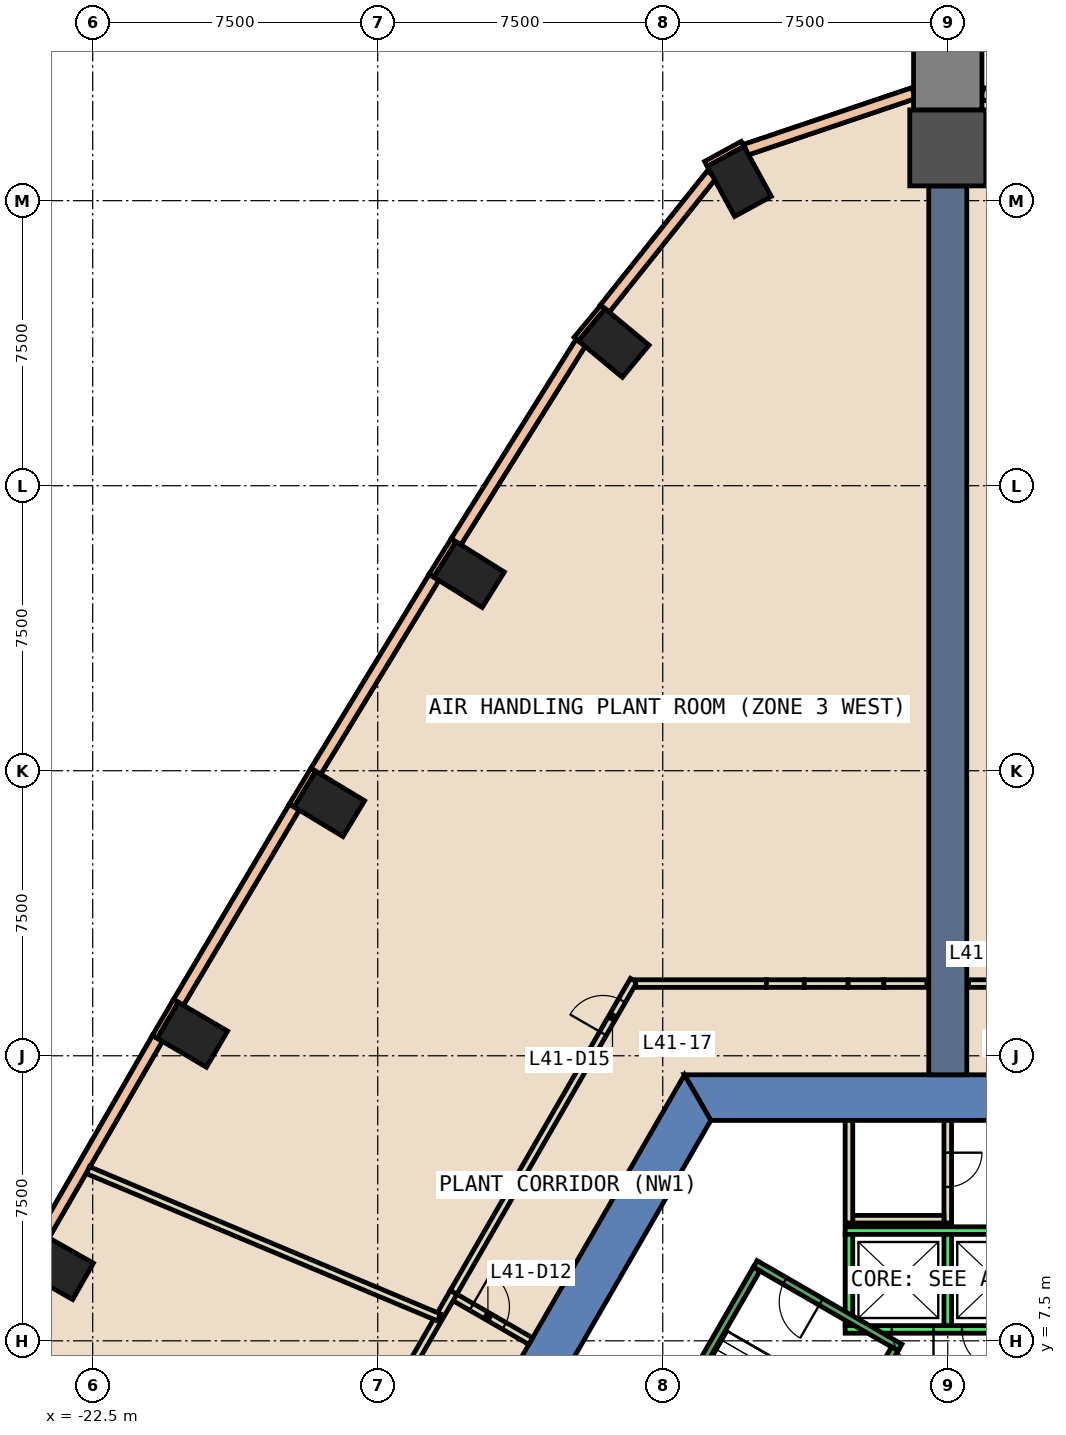
"""IFC4 building model, lengths in metres.
Left out: names, types, materials, properties, quantities, classifications, styles, units other than length and angle.
Written with IfcOpenShell. Run it as: python <this file> out.ifc"""

import sys

from ifc_helpers import new_model, si_unit, direction, frame, frame_2d, origin, origin_2d, place, context, subcontext, project, spatial, polyline, rectangle, outline, extrude, element, fill, save


model = new_model("IFC4")
c1 = context("Model", 3, precision=1e-05, world=origin(), true_north=direction((0.0, 1.0)))
c2 = subcontext(c1, "Body", "Model", "MODEL_VIEW")
j1 = project(units=[si_unit("LENGTHUNIT", "METRE"), si_unit("PLANEANGLEUNIT", "RADIAN")], contexts=[c1])
p1 = place(None, origin())
s1 = spatial("IfcSite", under=j1, at=p1, CompositionType="ELEMENT")
p2 = place(p1, origin())
s2 = spatial("IfcBuilding", under=s1, at=p2, CompositionType="ELEMENT")
p3 = place(p2, frame((0.0, 0.0, 184.4)))
s3 = spatial("IfcBuildingStorey", under=s2, at=p3, CompositionType="ELEMENT", Elevation=184.4)
p4 = place(p3, frame((0.0, 38.889, -0.6), z_axis=(0.0, 0.0, 1.0), x_axis=(0.0, 1.0, 0.0)))
e1 = element("IfcColumn", 1, at=p4, inside=s3, PredefinedType="COLUMN", context=c2, shape_type="SweptSolid", body=[
    extrude(rectangle(XDim=2.0, YDim=2.0, at=origin_2d()), origin(), (0.0, 0.0, 1.0), 5.4),
])
for number, where, z_axis, x_axis in (
    (2, (-5.485, 38.006, -0.6), (0.0, 0.0, 1.0), (0.878, 0.479, 0.0)),
    (3, (-8.789, 33.754, -0.6), (0.0, 0.0, 1.0), (0.639, 0.769, 0.0)),
    (4, (-12.596, 27.66, -0.6), (0.0, 0.0, 1.0), (0.53, 0.848, 0.0)),
    (5, (-16.272, 21.628, -0.6), (0.0, 0.0, 1.0), (0.518, 0.855, 0.0)),
    (6, (-19.876, 15.554, -0.6), (0.0, 0.0, 1.0), (0.506, 0.863, 0.0)),
    (7, (-23.407, 9.436, -0.6), (0.0, 0.0, 1.0), (0.494, 0.869, 0.0)),
):
    element("IfcColumn", number, at=place(p3, frame(where, z_axis=z_axis, x_axis=x_axis)), inside=s3, PredefinedType="COLUMN", context=c2, shape_type="SweptSolid", body=[
        extrude(rectangle(XDim=1.1, YDim=1.5, at=origin_2d()), origin(), (0.0, 0.0, 1.0), 5.4),
    ])
p5 = place(p3, frame((0.0, 40.789, -0.6), z_axis=(0.0, 0.0, 1.0), x_axis=(0.0, 1.0, 0.0)))
e8 = element("IfcColumn", 8, at=p5, inside=s3, PredefinedType="COLUMN", context=c2, shape_type="SweptSolid", body=[
    extrude(rectangle(XDim=1.8, YDim=1.8, at=origin_2d()), origin(), (0.0, 0.0, 1.0), 5.4),
])
p6 = place(p3, frame((0.0, 0.0, -0.6)))
e9 = element("IfcWall", 9, at=p6, inside=s3, PredefinedType="SHEAR", context=c2, shape_type="SweptSolid", body=[
    extrude(outline(polyline([(6.928, 14.5), (-6.928, 14.5), (-6.235, 13.3), (6.235, 13.3), (6.928, 14.5)])), origin(), (0.0, 0.0, 1.0), 5.4),
])
p7 = place(p3, frame((0.0, 0.0, -0.6)))
e10 = element("IfcWall", 10, at=p7, inside=s3, PredefinedType="SHEAR", context=c2, shape_type="SweptSolid", body=[
    extrude(outline(polyline([(-12.267, 5.252), (-11.228, 4.652), (-6.235, 13.3), (-6.928, 14.5), (-12.267, 5.252)])), origin(), (0.0, 0.0, 1.0), 5.4),
])
p8 = place(p3, frame((0.0, 14.5, 0.0), z_axis=(0.0, 0.0, 1.0), x_axis=(0.0, 1.0, 0.0)))
e11 = element("IfcWall", 11, at=p8, inside=s3, PredefinedType="SHEAR", context=c2, shape_type="SweptSolid", body=[
    extrude(rectangle(XDim=23.389, YDim=1.0, at=frame_2d((11.694, 0.0))), origin(), (0.0, 0.0, 1.0), 4.8),
])
p9 = place(p3, frame((-5.397, 38.994, 0.0), z_axis=(0.0, 0.0, 1.0), x_axis=(-0.877929486755, -0.478789950068, 0.0)))
e12 = element("IfcWall", 12, at=p9, inside=s3, PredefinedType="STANDARD", context=c2, shape_type="SweptSolid", body=[
    extrude(rectangle(XDim=1.1, YDim=0.15, at=frame_2d((0.55, 0.0))), origin(), (0.0, 0.0, 1.0), 4.8),
])
for number, where, z_axis, x_axis in (
    (13, (-9.072, 34.704, 0.0), (0.0, 0.0, 1.0), (-0.639, -0.769, 0.0)),
    (14, (-13.004, 28.564, 0.0), (0.0, 0.0, 1.0), (-0.53, -0.848, 0.0)),
    (15, (-16.693, 22.526, 0.0), (0.0, 0.0, 1.0), (-0.518, -0.855, 0.0)),
):
    element("IfcWall", number, at=place(p3, frame(where, z_axis=z_axis, x_axis=x_axis)), inside=s3, PredefinedType="STANDARD", context=c2, shape_type="SweptSolid", body=[
        extrude(rectangle(XDim=1.1, YDim=0.15, at=frame_2d((0.55, 0.0))), origin(), (0.0, 0.0, 1.0), 4.8),
    ])
p10 = place(p3, frame((-20.309, 16.445, 0.0), z_axis=(0.0, 0.0, 1.0), x_axis=(-0.506505715302, -0.862236603472, 0.0)))
e16 = element("IfcWall", 16, at=p10, inside=s3, PredefinedType="STANDARD", context=c2, shape_type="SweptSolid", body=[
    extrude(rectangle(XDim=1.099, YDim=0.15, at=frame_2d((0.55, 0.0))), origin(), (0.0, 0.0, 1.0), 4.8),
])
p11 = place(p3, frame((5.315, 38.84, 0.0), z_axis=(0.0, 0.0, 1.0), x_axis=(-0.947661997786, 0.319275332514, 0.0)))
e17 = element("IfcWall", 17, at=p11, inside=s3, PredefinedType="STANDARD", context=c2, shape_type="SweptSolid", body=[
    extrude(rectangle(XDim=4.66, YDim=0.3, at=frame_2d((2.33, 0.0))), origin(), (0.0, 0.0, 1.0), 1.2),
])
p12 = place(p3, frame((5.315, 38.84, 4.0), z_axis=(0.0, 0.0, 1.0), x_axis=(-0.947661997786, 0.319275332514, 0.0)))
e18 = element("IfcWall", 18, at=p12, inside=s3, PredefinedType="STANDARD", context=c2, shape_type="SweptSolid", body=[
    extrude(rectangle(XDim=4.66, YDim=0.3, at=frame_2d((2.33, 0.0))), origin(), (0.0, 0.0, 1.0), 0.8),
])
p13 = place(p3, frame((-0.899, 40.328, 0.0), z_axis=(0.0, 0.0, 1.0), x_axis=(-0.947661997786, -0.319275332514, 0.0)))
e19 = element("IfcWall", 19, at=p13, inside=s3, PredefinedType="STANDARD", context=c2, shape_type="SweptSolid", body=[
    extrude(rectangle(XDim=4.66, YDim=0.3, at=frame_2d((2.33, 0.0))), origin(), (0.0, 0.0, 1.0), 1.2),
])
p14 = place(p3, frame((-0.899, 40.328, 4.0), z_axis=(0.0, 0.0, 1.0), x_axis=(-0.947661997786, -0.319275332514, 0.0)))
e20 = element("IfcWall", 20, at=p14, inside=s3, PredefinedType="STANDARD", context=c2, shape_type="SweptSolid", body=[
    extrude(rectangle(XDim=4.66, YDim=0.3, at=frame_2d((2.33, 0.0))), origin(), (0.0, 0.0, 1.0), 0.8),
])
p15 = place(p3, frame((-6.21, 38.188, 0.0), z_axis=(0.0, 0.0, 1.0), x_axis=(-0.623651555058, -0.781702461218, 0.0)))
e21 = element("IfcWall", 21, at=p15, inside=s3, PredefinedType="STANDARD", context=c2, shape_type="SweptSolid", body=[
    extrude(rectangle(XDim=4.51, YDim=0.3, at=frame_2d((2.255, 0.0))), origin(), (0.0, 0.0, 1.0), 1.2),
])
p16 = place(p3, frame((-6.21, 38.188, 4.0), z_axis=(0.0, 0.0, 1.0), x_axis=(-0.623651555058, -0.781702461218, 0.0)))
e22 = element("IfcWall", 22, at=p16, inside=s3, PredefinedType="STANDARD", context=c2, shape_type="SweptSolid", body=[
    extrude(rectangle(XDim=4.51, YDim=0.3, at=frame_2d((2.255, 0.0))), origin(), (0.0, 0.0, 1.0), 0.8),
])
p17 = place(p3, frame((-9.659, 33.763, 0.0), z_axis=(0.0, 0.0, 1.0), x_axis=(-0.530698032758, -0.847560970094, 0.0)))
e23 = element("IfcWall", 23, at=p17, inside=s3, PredefinedType="STANDARD", context=c2, shape_type="SweptSolid", body=[
    extrude(rectangle(XDim=6.182, YDim=0.3, at=frame_2d((3.091, 0.0))), origin(), (0.0, 0.0, 1.0), 1.2),
])
p18 = place(p3, frame((-9.659, 33.763, 4.0), z_axis=(0.0, 0.0, 1.0), x_axis=(-0.530698032758, -0.847560970094, 0.0)))
e24 = element("IfcWall", 24, at=p18, inside=s3, PredefinedType="STANDARD", context=c2, shape_type="SweptSolid", body=[
    extrude(rectangle(XDim=6.182, YDim=0.3, at=frame_2d((3.091, 0.0))), origin(), (0.0, 0.0, 1.0), 0.8),
])
p19 = place(p3, frame((-13.517, 27.589, 0.0), z_axis=(0.0, 0.0, 1.0), x_axis=(-0.520441839765, -0.853897119928, 0.0)))
e25 = element("IfcWall", 25, at=p19, inside=s3, PredefinedType="STANDARD", context=c2, shape_type="SweptSolid", body=[
    extrude(rectangle(XDim=5.977, YDim=0.3, at=frame_2d((2.989, 0.0))), origin(), (0.0, 0.0, 1.0), 1.2),
])
p20 = place(p3, frame((-13.517, 27.589, 4.0), z_axis=(0.0, 0.0, 1.0), x_axis=(-0.520441839765, -0.853897119928, 0.0)))
e26 = element("IfcWall", 26, at=p20, inside=s3, PredefinedType="STANDARD", context=c2, shape_type="SweptSolid", body=[
    extrude(rectangle(XDim=5.977, YDim=0.3, at=frame_2d((2.989, 0.0))), origin(), (0.0, 0.0, 1.0), 0.8),
])
p21 = place(p3, frame((-17.194, 21.544, 0.0), z_axis=(0.0, 0.0, 1.0), x_axis=(-0.510120456318, -0.860102970606, 0.0)))
e27 = element("IfcWall", 27, at=p21, inside=s3, PredefinedType="STANDARD", context=c2, shape_type="SweptSolid", body=[
    extrude(rectangle(XDim=5.975, YDim=0.3, at=frame_2d((2.987, 0.0))), origin(), (0.0, 0.0, 1.0), 1.2),
])
p22 = place(p3, frame((-17.194, 21.544, 4.0), z_axis=(0.0, 0.0, 1.0), x_axis=(-0.510120456318, -0.860102970606, 0.0)))
e28 = element("IfcWall", 28, at=p22, inside=s3, PredefinedType="STANDARD", context=c2, shape_type="SweptSolid", body=[
    extrude(rectangle(XDim=5.975, YDim=0.3, at=frame_2d((2.987, 0.0))), origin(), (0.0, 0.0, 1.0), 0.8),
])
p23 = place(p3, frame((-20.797, 15.458, 0.0), z_axis=(0.0, 0.0, 1.0), x_axis=(-0.499926373932, -0.866067907642, 0.0)))
e29 = element("IfcWall", 29, at=p23, inside=s3, PredefinedType="STANDARD", context=c2, shape_type="SweptSolid", body=[
    extrude(rectangle(XDim=5.977, YDim=0.3, at=frame_2d((2.988, 0.0))), origin(), (0.0, 0.0, 1.0), 1.2),
])
p24 = place(p3, frame((-20.797, 15.458, 4.0), z_axis=(0.0, 0.0, 1.0), x_axis=(-0.499926373932, -0.866067907642, 0.0)))
e30 = element("IfcWall", 30, at=p24, inside=s3, PredefinedType="STANDARD", context=c2, shape_type="SweptSolid", body=[
    extrude(rectangle(XDim=5.977, YDim=0.3, at=frame_2d((2.988, 0.0))), origin(), (0.0, 0.0, 1.0), 0.8),
])
p25 = place(p3, frame((0.0, 13.3, 0.0), z_axis=(0.0, 0.0, 1.0), x_axis=(0.0, -1.0, 0.0)))
e31 = element("IfcWall", 31, at=p25, inside=s3, PredefinedType="PARTITIONING", context=c2, shape_type="SweptSolid", body=[
    extrude(rectangle(XDim=2.7, YDim=0.2, at=frame_2d((1.35, 0.0))), origin(), (0.0, 0.0, 1.0), 4.8),
])
p26 = place(p25, frame((0.85, 0.0, 0.0)))
e32 = element("IfcOpeningElement", 32, at=p26, cuts=e31, PredefinedType="OPENING", context=c2, shape_type="SweptSolid", body=[
    extrude(rectangle(XDim=0.9, YDim=2.1, at=frame_2d((0.45, 1.05))), frame((0.0, 0.11, 0.0), z_axis=(0.0, -1.0, 0.0), x_axis=(1.0, 0.0, 0.0)), (0.0, 0.0, 1.0), 0.22),
])
p27 = place(p3, frame((-0.1, 10.7, 0.0), z_axis=(0.0, 0.0, 1.0), x_axis=(-1.0, 0.0, 0.0)))
e33 = element("IfcWall", 33, at=p27, inside=s3, PredefinedType="PARTITIONING", context=c2, shape_type="SweptSolid", body=[
    extrude(rectangle(XDim=2.4, YDim=0.2, at=frame_2d((1.2, 0.0))), origin(), (0.0, 0.0, 1.0), 4.8),
])
p28 = place(p3, frame((-2.6, 10.6, 0.0), z_axis=(0.0, 0.0, 1.0), x_axis=(0.0, 1.0, 0.0)))
e34 = element("IfcWall", 34, at=p28, inside=s3, PredefinedType="PARTITIONING", context=c2, shape_type="SweptSolid", body=[
    extrude(rectangle(XDim=2.7, YDim=0.2, at=frame_2d((1.35, 0.0))), origin(), (0.0, 0.0, 1.0), 4.8),
])
p29 = place(p3, frame((0.55, 16.9, 0.0), z_axis=(0.0, 0.0, 1.0), x_axis=(1.0, 0.0, 0.0)))
e35 = element("IfcWall", 35, at=p29, inside=s3, PredefinedType="PARTITIONING", context=c2, shape_type="SweptSolid", body=[
    extrude(rectangle(XDim=2.51, YDim=0.2, at=frame_2d((1.255, 0.0))), origin(), (0.0, 0.0, 1.0), 4.8),
])
p30 = place(p29, frame((0.83, 0.0, 0.0)))
e36 = element("IfcOpeningElement", 36, at=p30, cuts=e35, PredefinedType="OPENING", context=c2, shape_type="SweptSolid", body=[
    extrude(rectangle(XDim=1.0, YDim=2.1, at=frame_2d((0.5, 1.05))), frame((0.0, 0.11, 0.0), z_axis=(0.0, -1.0, 0.0), x_axis=(1.0, 0.0, 0.0)), (0.0, 0.0, 1.0), 0.22),
])
p31 = place(p3, frame((0.0, 39.909, 0.0), z_axis=(0.0, 0.0, 1.0), x_axis=(0.0, 1.0, 0.0)))
e37 = element("IfcWall", 37, at=p31, inside=s3, PredefinedType="PARTITIONING", context=c2, shape_type="SweptSolid", body=[
    extrude(rectangle(XDim=0.5, YDim=0.2, at=frame_2d((0.25, 0.0))), origin(), (0.0, 0.0, 1.0), 4.8),
])
p32 = place(p3, frame((-13.053, 8.691, 0.0), z_axis=(0.0, 0.0, 1.0), x_axis=(0.865973769406, -0.500089422704, 0.0)))
e38 = element("IfcWall", 38, at=p32, inside=s3, PredefinedType="PARTITIONING", context=c2, shape_type="SweptSolid", body=[
    extrude(rectangle(XDim=2.399, YDim=0.2, at=frame_2d((1.2, 0.0))), origin(), (0.0, 0.0, 1.0), 4.8),
])
p33 = place(p32, frame((0.6, 0.0, 0.0)))
e39 = element("IfcOpeningElement", 39, at=p33, cuts=e38, PredefinedType="OPENING", context=c2, shape_type="SweptSolid", body=[
    extrude(rectangle(XDim=1.0, YDim=2.1, at=frame_2d((0.5, 1.05))), frame((0.0, 0.11, 0.0), z_axis=(0.0, -1.0, 0.0), x_axis=(1.0, 0.0, 0.0)), (0.0, 0.0, 1.0), 0.22),
])
p34 = place(p3, frame((-16.603, 2.542, 0.0), z_axis=(0.0, 0.0, 1.0), x_axis=(0.499968011863, 0.866043871356, 0.0)))
e40 = element("IfcWall", 40, at=p34, inside=s3, PredefinedType="PARTITIONING", context=c2, shape_type="SweptSolid", body=[
    extrude(rectangle(XDim=7.201, YDim=0.2, at=frame_2d((3.6, 0.0))), origin(), (0.0, 0.0, 1.0), 4.8),
])
p35 = place(p34, frame((2.654, 0.0, 0.0)))
e41 = element("IfcOpeningElement", 41, at=p35, cuts=e40, PredefinedType="OPENING", context=c2, shape_type="SweptSolid", body=[
    extrude(rectangle(XDim=1.0, YDim=2.1, at=frame_2d((0.5, 1.05))), frame((0.0, 0.11, 0.0), z_axis=(0.0, -1.0, 0.0), x_axis=(1.0, 0.0, 0.0)), (0.0, 0.0, 1.0), 0.22),
])
p36 = place(p3, frame((-13.003, 8.778, 0.0), z_axis=(0.0, 0.0, 1.0), x_axis=(0.499964736285, 0.866045762343, 0.0)))
e42 = element("IfcWall", 42, at=p36, inside=s3, PredefinedType="PARTITIONING", context=c2, shape_type="SweptSolid", body=[
    extrude(rectangle(XDim=9.479, YDim=0.2, at=frame_2d((4.739, 0.0))), origin(), (0.0, 0.0, 1.0), 4.8),
])
p37 = place(p36, frame((7.862, 0.0, 0.0)))
e43 = element("IfcOpeningElement", 43, at=p37, cuts=e42, PredefinedType="OPENING", context=c2, shape_type="SweptSolid", body=[
    extrude(rectangle(XDim=1.0, YDim=2.1, at=frame_2d((0.5, 1.05))), frame((0.0, 0.11, 0.0), z_axis=(0.0, -1.0, 0.0), x_axis=(1.0, 0.0, 0.0)), (0.0, 0.0, 1.0), 0.22),
])
p38 = place(p3, frame((-8.214, 16.9, 0.0), z_axis=(0.0, 0.0, 1.0), x_axis=(1.0, 0.0, 0.0)))
e44 = element("IfcWall", 44, at=p38, inside=s3, PredefinedType="PARTITIONING", context=c2, shape_type="SweptSolid", body=[
    extrude(rectangle(XDim=3.441, YDim=0.2, at=frame_2d((1.721, 0.0))), origin(), (0.0, 0.0, 1.0), 4.8),
])
p39 = place(p3, frame((-22.625, 11.99, 0.0), z_axis=(0.0, 0.0, 1.0), x_axis=(0.922173915382, -0.386775477233, 0.0)))
e45 = element("IfcWall", 45, at=p39, inside=s3, PredefinedType="PARTITIONING", context=c2, shape_type="SweptSolid", body=[
    extrude(rectangle(XDim=10.019, YDim=0.2, at=frame_2d((5.009, 0.0))), origin(), (0.0, 0.0, 1.0), 4.8),
])
p40 = place(p3, frame((-4.773, 16.9, 0.0), z_axis=(0.0, 0.0, 1.0), x_axis=(1.0, 0.0, 0.0)))
e46 = element("IfcWall", 46, at=p40, inside=s3, PredefinedType="PARTITIONING", context=c2, shape_type="SweptSolid", body=[
    extrude(rectangle(XDim=0.998, YDim=0.2, at=frame_2d((0.499, 0.0))), origin(), (0.0, 0.0, 1.0), 2.4),
])
p41 = place(p3, frame((-3.775, 16.9, 0.0), z_axis=(0.0, 0.0, 1.0), x_axis=(1.0, 0.0, 0.0)))
e47 = element("IfcWall", 47, at=p41, inside=s3, PredefinedType="PARTITIONING", context=c2, shape_type="SweptSolid", body=[
    extrude(rectangle(XDim=1.153, YDim=0.2, at=frame_2d((0.576, 0.0))), origin(), (0.0, 0.0, 1.0), 4.8),
])
p42 = place(p3, frame((-2.622, 16.9, 0.0), z_axis=(0.0, 0.0, 1.0), x_axis=(1.0, 0.0, 0.0)))
e48 = element("IfcWall", 48, at=p42, inside=s3, PredefinedType="PARTITIONING", context=c2, shape_type="SweptSolid", body=[
    extrude(rectangle(XDim=0.94, YDim=0.2, at=frame_2d((0.47, 0.0))), origin(), (0.0, 0.0, 1.0), 2.4),
])
p43 = place(p3, frame((-1.682, 16.9, 0.0), z_axis=(0.0, 0.0, 1.0), x_axis=(1.0, 0.0, 0.0)))
e49 = element("IfcWall", 49, at=p43, inside=s3, PredefinedType="PARTITIONING", context=c2, shape_type="SweptSolid", body=[
    extrude(rectangle(XDim=1.132, YDim=0.2, at=frame_2d((0.566, 0.0))), origin(), (0.0, 0.0, 1.0), 4.8),
])
p44 = place(p3, frame((2.7, 7.8, 0.0), z_axis=(0.0, 0.0, 1.0), x_axis=(-1.0, 0.0, 0.0)))
e50 = element("IfcWall", 50, at=p44, inside=s3, PredefinedType="STANDARD", context=c2, shape_type="SweptSolid", body=[
    extrude(rectangle(XDim=5.4, YDim=0.2, at=frame_2d((2.7, 0.0))), origin(), (0.0, 0.0, 1.0), 4.8),
])
p45 = place(p44, frame((1.225, 0.0, 0.0)))
e51 = element("IfcOpeningElement", 51, at=p45, cuts=e50, PredefinedType="OPENING", context=c2, shape_type="SweptSolid", body=[
    extrude(rectangle(XDim=1.1, YDim=2.1, at=frame_2d((0.55, 1.05))), frame((0.0, 0.11, 0.0), z_axis=(0.0, -1.0, 0.0), x_axis=(1.0, 0.0, 0.0)), (0.0, 0.0, 1.0), 0.22),
])
p46 = place(p44, frame((3.075, 0.0, 0.0)))
e52 = element("IfcOpeningElement", 52, at=p46, cuts=e50, PredefinedType="OPENING", context=c2, shape_type="SweptSolid", body=[
    extrude(rectangle(XDim=1.1, YDim=2.1, at=frame_2d((0.55, 1.05))), frame((0.0, 0.11, 0.0), z_axis=(0.0, -1.0, 0.0), x_axis=(1.0, 0.0, 0.0)), (0.0, 0.0, 1.0), 0.22),
])
p47 = place(p3, frame((2.7, 10.4, 0.0), z_axis=(0.0, 0.0, 1.0), x_axis=(-1.0, 0.0, 0.0)))
e53 = element("IfcWall", 53, at=p47, inside=s3, PredefinedType="STANDARD", context=c2, shape_type="SweptSolid", body=[
    extrude(rectangle(XDim=5.4, YDim=0.2, at=frame_2d((2.7, 0.0))), origin(), (0.0, 0.0, 1.0), 4.8),
])
for number, where, z_axis, x_axis in (
    (54, (0.0, 7.9, 0.0), (0.0, 0.0, 1.0), (0.0, 1.0, 0.0)),
    (55, (-2.6, 7.9, 0.0), (0.0, 0.0, 1.0), (0.0, 1.0, 0.0)),
):
    element("IfcWall", number, at=place(p3, frame(where, z_axis=z_axis, x_axis=x_axis)), inside=s3, PredefinedType="STANDARD", context=c2, shape_type="SweptSolid", body=[
        extrude(rectangle(XDim=2.4, YDim=0.2, at=frame_2d((1.2, 0.0))), origin(), (0.0, 0.0, 1.0), 4.8),
    ])
p48 = place(p3, frame((-1.256, 7.324, 0.0), z_axis=(0.0, 0.0, 1.0), x_axis=(-0.866046073146, 0.499964197906, 0.0)))
e56 = element("IfcWall", 56, at=p48, inside=s3, PredefinedType="STANDARD", context=c2, shape_type="SweptSolid", body=[
    extrude(rectangle(XDim=4.4, YDim=0.2, at=frame_2d((2.2, 0.0))), origin(), (0.0, 0.0, 1.0), 4.8),
])
p49 = place(p48, frame((2.4, 0.0, 0.0)))
e57 = element("IfcOpeningElement", 57, at=p49, cuts=e56, PredefinedType="OPENING", context=c2, shape_type="SweptSolid", body=[
    extrude(rectangle(XDim=1.1, YDim=2.2, at=frame_2d((0.55, 1.1))), frame((0.0, 0.11, 0.0), z_axis=(0.0, -1.0, 0.0), x_axis=(1.0, 0.0, 0.0)), (0.0, 0.0, 1.0), 0.22),
])
p50 = place(p3, frame((-1.393, 7.288, 0.0), z_axis=(0.0, 0.0, 1.0), x_axis=(-0.499963383562, -0.866046543262, 0.0)))
e58 = element("IfcWall", 58, at=p50, inside=s3, PredefinedType="STANDARD", context=c2, shape_type="SweptSolid", body=[
    extrude(rectangle(XDim=6.9, YDim=0.2, at=frame_2d((3.45, 0.0))), origin(), (0.0, 0.0, 1.0), 4.8),
])
p51 = place(p50, frame((0.45, 0.0, 0.0)))
e59 = element("IfcOpeningElement", 59, at=p51, cuts=e58, PredefinedType="OPENING", context=c2, shape_type="SweptSolid", body=[
    extrude(rectangle(XDim=1.1, YDim=2.2, at=frame_2d((0.55, 1.1))), frame((0.0, 0.11, 0.0), z_axis=(0.0, -1.0, 0.0), x_axis=(1.0, 0.0, 0.0)), (0.0, 0.0, 1.0), 0.22),
])
p52 = place(p3, frame((-5.03, 9.388, 0.0), z_axis=(0.0, 0.0, 1.0), x_axis=(-0.499978703459, -0.866037698999, 0.0)))
e60 = element("IfcWall", 60, at=p52, inside=s3, PredefinedType="STANDARD", context=c2, shape_type="SweptSolid", body=[
    extrude(rectangle(XDim=6.9, YDim=0.2, at=frame_2d((3.45, 0.0))), origin(), (0.0, 0.0, 1.0), 4.8),
])
p53 = place(p33, origin())
e61 = element("IfcDoor", 61, at=p53, inside=s3, OperationType="SINGLE_SWING_RIGHT", PredefinedType="DOOR", context=c2, shape_type="SweptSolid", body=[
    extrude(rectangle(XDim=1.0, YDim=2.1, at=frame_2d((0.5, 1.05))), frame((0.0, 0.025, 0.0), z_axis=(0.0, -1.0, 0.0), x_axis=(1.0, 0.0, 0.0)), (0.0, 0.0, 1.0), 0.05),
])
fill(e39, e61)
p54 = place(p37, origin())
e62 = element("IfcDoor", 62, at=p54, inside=s3, OperationType="SINGLE_SWING_LEFT", PredefinedType="DOOR", context=c2, shape_type="SweptSolid", body=[
    extrude(rectangle(XDim=1.0, YDim=2.1, at=frame_2d((0.5, 1.05))), frame((0.0, 0.025, 0.0), z_axis=(0.0, -1.0, 0.0), x_axis=(1.0, 0.0, 0.0)), (0.0, 0.0, 1.0), 0.05),
])
fill(e43, e62)
p55 = place(p26, origin())
e63 = element("IfcDoor", 63, at=p55, inside=s3, OperationType="SINGLE_SWING_RIGHT", PredefinedType="DOOR", context=c2, shape_type="SweptSolid", body=[
    extrude(rectangle(XDim=0.9, YDim=2.1, at=frame_2d((0.45, 1.05))), frame((0.0, 0.025, 0.0), z_axis=(0.0, -1.0, 0.0), x_axis=(1.0, 0.0, 0.0)), (0.0, 0.0, 1.0), 0.05),
])
fill(e32, e63)
p56 = place(p45, origin())
e64 = element("IfcDoor", 64, at=p56, inside=s3, OperationType="SLIDING_TO_LEFT", PredefinedType="DOOR", context=c2, shape_type="SweptSolid", body=[
    extrude(rectangle(XDim=1.1, YDim=2.1, at=frame_2d((0.55, 1.05))), frame((0.0, 0.025, 0.0), z_axis=(0.0, -1.0, 0.0), x_axis=(1.0, 0.0, 0.0)), (0.0, 0.0, 1.0), 0.05),
])
fill(e51, e64)
p57 = place(p46, origin())
e65 = element("IfcDoor", 65, at=p57, inside=s3, OperationType="SLIDING_TO_LEFT", PredefinedType="DOOR", context=c2, shape_type="SweptSolid", body=[
    extrude(rectangle(XDim=1.1, YDim=2.1, at=frame_2d((0.55, 1.05))), frame((0.0, 0.025, 0.0), z_axis=(0.0, -1.0, 0.0), x_axis=(1.0, 0.0, 0.0)), (0.0, 0.0, 1.0), 0.05),
])
fill(e52, e65)
p58 = place(p49, origin())
e66 = element("IfcDoor", 66, at=p58, inside=s3, OperationType="SINGLE_SWING_LEFT", PredefinedType="DOOR", context=c2, shape_type="SweptSolid", body=[
    extrude(rectangle(XDim=1.1, YDim=2.2, at=frame_2d((0.55, 1.1))), frame((0.0, 0.025, 0.0), z_axis=(0.0, -1.0, 0.0), x_axis=(1.0, 0.0, 0.0)), (0.0, 0.0, 1.0), 0.05),
])
fill(e57, e66)
save(model, sys.argv[1])
